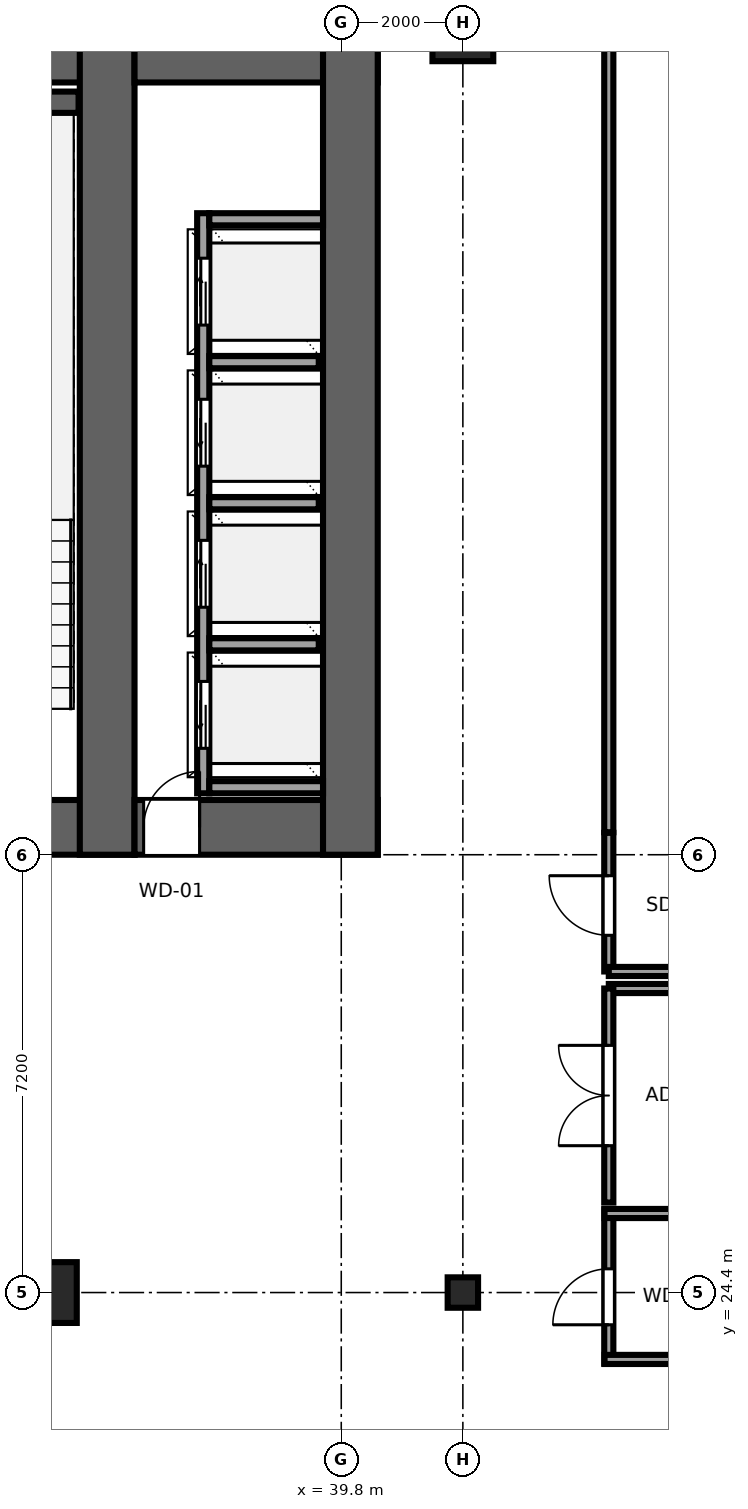
"""IFC4 building model, lengths in metres.
Left out: names, types, materials, properties, quantities, classifications, styles, units other than length and angle.
Written with IfcOpenShell. Run it as: python <this file> out.ifc"""

import sys

from ifc_helpers import new_model, si_unit, direction, frame, frame_2d, origin, origin_2d, place, context, subcontext, project, spatial, rectangle, i_section, extrude, source, transform, mapped, element, fill, save


model = new_model("IFC4")
c1 = context("Model", 3, precision=1e-05, world=origin(), true_north=direction((0.0, 1.0)))
c2 = subcontext(c1, "Body", "Model", "MODEL_VIEW")
j1 = project(units=[si_unit("LENGTHUNIT", "METRE"), si_unit("PLANEANGLEUNIT", "RADIAN")], contexts=[c1])
p1 = place(None, origin())
s1 = spatial("IfcSite", under=j1, at=p1, CompositionType="ELEMENT")
p2 = place(p1, origin())
s2 = spatial("IfcBuilding", under=s1, at=p2, CompositionType="ELEMENT")
p3 = place(p2, frame((0.0, 0.0, 74.6)))
s3 = spatial("IfcBuildingStorey", under=s2, at=p3, CompositionType="ELEMENT", Elevation=74.6)
p4 = place(p3, frame((9.6, 32.05, 0.0), z_axis=(0.0, 0.0, 1.0), x_axis=(1.0, 0.0, 0.0)))
e1 = element("IfcWall", 1, at=p4, inside=s3, PredefinedType="SHEAR", context=c2, shape_type="SweptSolid", body=[
    extrude(rectangle(XDim=26.8, YDim=0.9, at=frame_2d((13.4, 0.0))), origin(), (0.0, 0.0, 1.0), 3.55),
])
p5 = place(p4, frame((7.85, 0.0, 0.0), z_axis=(0.0, 0.0, 1.0), x_axis=(-1.0, 0.0, 0.0)))
e2 = element("IfcOpeningElement", 2, at=p5, cuts=e1, PredefinedType="OPENING", context=c2, shape_type="SweptSolid", body=[
    extrude(rectangle(XDim=1.5, YDim=2.04, at=frame_2d((0.75, 1.02))), frame((0.0, 0.46, 0.0), z_axis=(0.0, -1.0, 0.0), x_axis=(1.0, 0.0, 0.0)), (0.0, 0.0, 1.0), 0.92),
])
p6 = place(p4, frame((14.15, 0.0, 0.0), z_axis=(0.0, 0.0, 1.0), x_axis=(-1.0, 0.0, 0.0)))
e3 = element("IfcOpeningElement", 3, at=p6, cuts=e1, PredefinedType="OPENING", context=c2, shape_type="SweptSolid", body=[
    extrude(rectangle(XDim=1.5, YDim=2.04, at=frame_2d((0.75, 1.02))), frame((0.0, 0.46, 0.0), z_axis=(0.0, -1.0, 0.0), x_axis=(1.0, 0.0, 0.0)), (0.0, 0.0, 1.0), 0.92),
])
p7 = place(p4, frame((20.45, 0.0, 0.0), z_axis=(0.0, 0.0, 1.0), x_axis=(-1.0, 0.0, 0.0)))
e4 = element("IfcOpeningElement", 4, at=p7, cuts=e1, PredefinedType="OPENING", context=c2, shape_type="SweptSolid", body=[
    extrude(rectangle(XDim=1.5, YDim=2.04, at=frame_2d((0.75, 1.02))), frame((0.0, 0.46, 0.0), z_axis=(0.0, -1.0, 0.0), x_axis=(1.0, 0.0, 0.0)), (0.0, 0.0, 1.0), 0.92),
])
p8 = place(p3, frame((9.6, 44.75, 0.0), z_axis=(0.0, 0.0, 1.0), x_axis=(1.0, 0.0, 0.0)))
e5 = element("IfcWall", 5, at=p8, inside=s3, PredefinedType="SHEAR", context=c2, shape_type="SweptSolid", body=[
    extrude(rectangle(XDim=26.8, YDim=0.9, at=frame_2d((13.4, 0.0))), origin(), (0.0, 0.0, 1.0), 3.55),
])
p9 = place(p3, frame((35.95, 31.6, 0.0), z_axis=(0.0, 0.0, 1.0), x_axis=(0.0, 1.0, 0.0)))
e6 = element("IfcWall", 6, at=p9, inside=s3, PredefinedType="SHEAR", context=c2, shape_type="SweptSolid", body=[
    extrude(rectangle(XDim=13.6, YDim=0.9, at=frame_2d((6.8, 0.0))), origin(), (0.0, 0.0, 1.0), 3.55),
])
p10 = place(p3, frame((36.4, 32.05, 0.0), z_axis=(0.0, 0.0, 1.0), x_axis=(1.0, 0.0, 0.0)))
e7 = element("IfcWall", 7, at=p10, inside=s3, PredefinedType="SHEAR", context=c2, shape_type="SweptSolid", body=[
    extrude(rectangle(XDim=4.0, YDim=0.9, at=frame_2d((2.0, 0.0))), origin(), (0.0, 0.0, 1.0), 3.55),
])
p11 = place(p10, frame((1.07, 0.0, 0.0), z_axis=(0.0, 0.0, 1.0), x_axis=(-1.0, 0.0, 0.0)))
e8 = element("IfcOpeningElement", 8, at=p11, cuts=e7, PredefinedType="OPENING", context=c2, shape_type="SweptSolid", body=[
    extrude(rectangle(XDim=0.92, YDim=2.01, at=frame_2d((0.46, 1.005))), frame((0.0, 0.46, 0.0), z_axis=(0.0, -1.0, 0.0), x_axis=(1.0, 0.0, 0.0)), (0.0, 0.0, 1.0), 0.92),
])
p12 = place(p3, frame((36.4, 44.75, 0.0), z_axis=(0.0, 0.0, 1.0), x_axis=(1.0, 0.0, 0.0)))
e9 = element("IfcWall", 9, at=p12, inside=s3, PredefinedType="SHEAR", context=c2, shape_type="SweptSolid", body=[
    extrude(rectangle(XDim=4.0, YDim=0.9, at=frame_2d((2.0, 0.0))), origin(), (0.0, 0.0, 1.0), 3.55),
])
p13 = place(p3, frame((39.95, 31.6, 0.0), z_axis=(0.0, 0.0, 1.0), x_axis=(0.0, 1.0, 0.0)))
e10 = element("IfcWall", 10, at=p13, inside=s3, PredefinedType="SHEAR", context=c2, shape_type="SweptSolid", body=[
    extrude(rectangle(XDim=13.6, YDim=0.9, at=frame_2d((6.8, 0.0))), origin(), (0.0, 0.0, 1.0), 3.55),
])
p14 = place(p3, frame((31.88, 43.975, 0.0), z_axis=(0.0, 0.0, 1.0), x_axis=(1.0, 0.0, 0.0)))
e11 = element("IfcWall", 11, at=p14, inside=s3, PredefinedType="SHEAR", context=c2, shape_type="SweptSolid", body=[
    extrude(rectangle(XDim=3.6, YDim=0.35, at=frame_2d((1.8, 0.0))), origin(), (0.0, 0.0, 1.0), 3.55),
])
m1 = source(origin(), c2, "Body", "SweptSolid", [
    extrude(rectangle(XDim=1.0, YDim=1.0, at=origin_2d()), origin(), (0.0, 0.0, 1.0), 3.55),
])
p15 = place(p3, frame((34.95, 24.4, 0.0), z_axis=(0.0, 0.0, 1.0), x_axis=(1.0, 0.0, 0.0)))
e12 = element("IfcColumn", 12, at=p15, inside=s3, PredefinedType="COLUMN", context=c2, shape_type="MappedRepresentation", body=[
    mapped(m1, transform((0.0, 0.0, 0.0), x_axis=(1.0, 0.0, 0.0), y_axis=(0.0, 1.0, 0.0), z_axis=(0.0, 0.0, 1.0), scale=1.0)),
])
m2 = source(origin(), c2, "Body", "SweptSolid", [
    extrude(i_section(OverallWidth=0.5, OverallDepth=0.5, WebThickness=0.028, FlangeThickness=0.045, at=origin_2d()), origin(), (0.0, 0.0, 1.0), 3.55),
])
p16 = place(p3, frame((41.8, 24.4, 0.0), z_axis=(0.0, 0.0, 1.0), x_axis=(1.0, 0.0, 0.0)))
e13 = element("IfcColumn", 13, at=p16, inside=s3, PredefinedType="COLUMN", context=c2, shape_type="MappedRepresentation", body=[
    mapped(m2, transform((0.0, 0.0, 0.0), x_axis=(1.0, 0.0, 0.0), y_axis=(0.0, 1.0, 0.0), z_axis=(0.0, 0.0, 1.0), scale=1.0)),
])
p17 = place(p3, frame((41.8, 45.15, 0.0), z_axis=(0.0, 0.0, 1.0), x_axis=(1.0, 0.0, 0.0)))
e14 = element("IfcColumn", 14, at=p17, inside=s3, PredefinedType="COLUMN", context=c2, shape_type="MappedRepresentation", body=[
    mapped(m1, transform((0.0, 0.0, 0.0), x_axis=(1.0, 0.0, 0.0), y_axis=(0.0, 1.0, 0.0), z_axis=(0.0, 0.0, 1.0), scale=1.0)),
])
p18 = place(p3, frame((37.53, 32.61, 0.0), z_axis=(0.0, 0.0, 1.0), x_axis=(0.0, 1.0, 0.0)))
e15 = element("IfcWall", 15, at=p18, inside=s3, PredefinedType="SOLIDWALL", context=c2, shape_type="SweptSolid", body=[
    extrude(rectangle(XDim=9.54, YDim=0.2, at=frame_2d((4.77, 0.0))), origin(), (0.0, 0.0, 1.0), 3.37),
])
p19 = place(p18, frame((0.74, 0.0, 0.0)))
e16 = element("IfcOpeningElement", 16, at=p19, cuts=e15, PredefinedType="OPENING", context=c2, shape_type="SweptSolid", body=[
    extrude(rectangle(XDim=1.1, YDim=2.12, at=frame_2d((0.55, 1.06))), frame((0.0, 0.11, 0.0), z_axis=(0.0, -1.0, 0.0), x_axis=(1.0, 0.0, 0.0)), (0.0, 0.0, 1.0), 0.22),
])
p20 = place(p18, frame((3.06, 0.0, 0.0)))
e17 = element("IfcOpeningElement", 17, at=p20, cuts=e15, PredefinedType="OPENING", context=c2, shape_type="SweptSolid", body=[
    extrude(rectangle(XDim=1.1, YDim=2.12, at=frame_2d((0.55, 1.06))), frame((0.0, 0.11, 0.0), z_axis=(0.0, -1.0, 0.0), x_axis=(1.0, 0.0, 0.0)), (0.0, 0.0, 1.0), 0.22),
])
p21 = place(p18, frame((5.38, 0.0, 0.0)))
e18 = element("IfcOpeningElement", 18, at=p21, cuts=e15, PredefinedType="OPENING", context=c2, shape_type="SweptSolid", body=[
    extrude(rectangle(XDim=1.1, YDim=2.12, at=frame_2d((0.55, 1.06))), frame((0.0, 0.11, 0.0), z_axis=(0.0, -1.0, 0.0), x_axis=(1.0, 0.0, 0.0)), (0.0, 0.0, 1.0), 0.22),
])
p22 = place(p18, frame((7.7, 0.0, 0.0)))
e19 = element("IfcOpeningElement", 19, at=p22, cuts=e15, PredefinedType="OPENING", context=c2, shape_type="SweptSolid", body=[
    extrude(rectangle(XDim=1.1, YDim=2.12, at=frame_2d((0.55, 1.06))), frame((0.0, 0.11, 0.0), z_axis=(0.0, -1.0, 0.0), x_axis=(1.0, 0.0, 0.0)), (0.0, 0.0, 1.0), 0.22),
])
for number, where, z_axis, x_axis in (
    (20, (37.63, 32.71, 0.0), (0.0, 0.0, 1.0), (1.0, 0.0, 0.0)),
    (21, (37.63, 42.05, 0.0), (0.0, 0.0, 1.0), (1.0, 0.0, 0.0)),
):
    element("IfcWall", number, at=place(p3, frame(where, z_axis=z_axis, x_axis=x_axis)), inside=s3, PredefinedType="SOLIDWALL", context=c2, shape_type="SweptSolid", body=[
        extrude(rectangle(XDim=1.87, YDim=0.2, at=frame_2d((0.935, 0.0))), origin(), (0.0, 0.0, 1.0), 3.37),
    ])
for number, where, z_axis, x_axis in (
    (22, (37.63, 35.06, 0.0), (0.0, 0.0, 1.0), (1.0, 0.0, 0.0)),
    (23, (37.63, 37.38, 0.0), (0.0, 0.0, 1.0), (1.0, 0.0, 0.0)),
    (24, (37.63, 39.7, 0.0), (0.0, 0.0, 1.0), (1.0, 0.0, 0.0)),
):
    element("IfcWall", number, at=place(p3, frame(where, z_axis=z_axis, x_axis=x_axis)), inside=s3, PredefinedType="SOLIDWALL", context=c2, shape_type="SweptSolid", body=[
        extrude(rectangle(XDim=1.8, YDim=0.2, at=frame_2d((0.9, 0.0))), origin(), (0.0, 0.0, 1.0), 3.37),
    ])
p23 = place(p3, frame((44.2, 23.23, 0.0), z_axis=(0.0, 0.0, 1.0), x_axis=(0.0, 1.0, 0.0)))
e25 = element("IfcWall", 25, at=p23, inside=s3, PredefinedType="PARTITIONING", context=c2, shape_type="SweptSolid", body=[
    extrude(rectangle(XDim=2.54, YDim=0.15, at=frame_2d((1.27, 0.0))), origin(), (0.0, 0.0, 1.0), 3.37),
])
p24 = place(p23, frame((0.64, 0.0, 0.0)))
e26 = element("IfcOpeningElement", 26, at=p24, cuts=e25, PredefinedType="OPENING", context=c2, shape_type="SweptSolid", body=[
    extrude(rectangle(XDim=0.92, YDim=2.01, at=frame_2d((0.46, 1.005))), frame((0.0, 0.085, 0.0), z_axis=(0.0, -1.0, 0.0), x_axis=(1.0, 0.0, 0.0)), (0.0, 0.0, 1.0), 0.17),
])
p25 = place(p3, frame((44.13, 23.3, 0.0), z_axis=(0.0, 0.0, 1.0), x_axis=(1.0, 0.0, 0.0)))
e27 = element("IfcWall", 27, at=p25, inside=s3, PredefinedType="PARTITIONING", context=c2, shape_type="SweptSolid", body=[
    extrude(rectangle(XDim=4.54, YDim=0.15, at=frame_2d((2.27, 0.0))), origin(), (0.0, 0.0, 1.0), 3.37),
])
p26 = place(p3, frame((44.13, 25.7, 0.0), z_axis=(0.0, 0.0, 1.0), x_axis=(1.0, 0.0, 0.0)))
e28 = element("IfcWall", 28, at=p26, inside=s3, PredefinedType="PARTITIONING", context=c2, shape_type="SweptSolid", body=[
    extrude(rectangle(XDim=12.57, YDim=0.15, at=frame_2d((6.285, 0.0))), origin(), (0.0, 0.0, 1.0), 3.37),
])
p27 = place(p3, frame((44.2, 29.4, 0.0), z_axis=(0.0, 0.0, 1.0), x_axis=(1.0, 0.0, 0.0)))
e29 = element("IfcWall", 29, at=p27, inside=s3, PredefinedType="PARTITIONING", context=c2, shape_type="SweptSolid", body=[
    extrude(rectangle(XDim=12.5, YDim=0.15, at=frame_2d((6.25, 0.0))), origin(), (0.0, 0.0, 1.0), 3.37),
])
p28 = place(p3, frame((44.2, 25.88, 0.0), z_axis=(0.0, 0.0, 1.0), x_axis=(0.0, 1.0, 0.0)))
e30 = element("IfcWall", 30, at=p28, inside=s3, PredefinedType="PARTITIONING", context=c2, shape_type="SweptSolid", body=[
    extrude(rectangle(XDim=3.52, YDim=0.15, at=frame_2d((1.76, 0.0))), origin(), (0.0, 0.0, 1.0), 3.37),
])
p29 = place(p28, frame((0.935, 0.0, 0.0)))
e31 = element("IfcOpeningElement", 31, at=p29, cuts=e30, PredefinedType="OPENING", context=c2, shape_type="SweptSolid", body=[
    extrude(rectangle(XDim=1.65, YDim=2.15, at=frame_2d((0.825, 1.075))), frame((0.0, 0.085, 0.0), z_axis=(0.0, -1.0, 0.0), x_axis=(1.0, 0.0, 0.0)), (0.0, 0.0, 1.0), 0.17),
])
p30 = place(p3, frame((44.2, 29.68, 0.0), z_axis=(0.0, 0.0, 1.0), x_axis=(0.0, 1.0, 0.0)))
e32 = element("IfcWall", 32, at=p30, inside=s3, PredefinedType="PARTITIONING", context=c2, shape_type="SweptSolid", body=[
    extrude(rectangle(XDim=2.28, YDim=0.15, at=frame_2d((1.14, 0.0))), origin(), (0.0, 0.0, 1.0), 3.37),
])
p31 = place(p30, frame((0.595, 0.0, 0.0)))
e33 = element("IfcOpeningElement", 33, at=p31, cuts=e32, PredefinedType="OPENING", context=c2, shape_type="SweptSolid", body=[
    extrude(rectangle(XDim=0.98, YDim=2.12, at=frame_2d((0.49, 1.06))), frame((0.0, 0.085, 0.0), z_axis=(0.0, -1.0, 0.0), x_axis=(1.0, 0.0, 0.0)), (0.0, 0.0, 1.0), 0.17),
])
p32 = place(p3, frame((44.2, 29.68, 0.0), z_axis=(0.0, 0.0, 1.0), x_axis=(1.0, 0.0, 0.0)))
e34 = element("IfcWall", 34, at=p32, inside=s3, PredefinedType="PARTITIONING", context=c2, shape_type="SweptSolid", body=[
    extrude(rectangle(XDim=10.03, YDim=0.15, at=frame_2d((5.015, 0.0))), origin(), (0.0, 0.0, 1.0), 3.37),
])
p33 = place(p3, frame((44.2, 31.97, 0.0), z_axis=(0.0, 0.0, 1.0), x_axis=(0.0, 1.0, 0.0)))
e35 = element("IfcWall", 35, at=p33, inside=s3, PredefinedType="PARTITIONING", context=c2, shape_type="SweptSolid", body=[
    extrude(rectangle(XDim=13.625, YDim=0.15, at=frame_2d((6.812, 0.0))), origin(), (0.0, 0.0, 1.0), 3.37),
])
m3 = source(origin(), c2, "Body", "SweptSolid", [
    extrude(rectangle(XDim=0.92, YDim=2.01, at=frame_2d((0.46, 1.005))), frame((0.0, 0.025, 0.0), z_axis=(0.0, -1.0, 0.0), x_axis=(1.0, 0.0, 0.0)), (0.0, 0.0, 1.0), 0.05),
])
p34 = place(p11, origin())
e36 = element("IfcDoor", 36, at=p34, inside=s3, OperationType="SINGLE_SWING_RIGHT", PredefinedType="DOOR", context=c2, shape_type="MappedRepresentation", body=[
    mapped(m3, transform((0.0, 0.0, 0.0), x_axis=(1.0, 0.0, 0.0), y_axis=(0.0, 1.0, 0.0), z_axis=(0.0, 0.0, 1.0), scale=1.0)),
])
fill(e8, e36)
m4 = source(origin(), c2, "Body", "SweptSolid", [
    extrude(rectangle(XDim=1.1, YDim=2.12, at=frame_2d((0.55, 1.06))), frame((0.0, 0.025, 0.0), z_axis=(0.0, -1.0, 0.0), x_axis=(1.0, 0.0, 0.0)), (0.0, 0.0, 1.0), 0.05),
])
p35 = place(p19, origin())
e37 = element("IfcDoor", 37, at=p35, inside=s3, OperationType="SLIDING_TO_LEFT", PredefinedType="DOOR", context=c2, shape_type="MappedRepresentation", body=[
    mapped(m4, transform((0.0, 0.0, 0.0), x_axis=(1.0, 0.0, 0.0), y_axis=(0.0, 1.0, 0.0), z_axis=(0.0, 0.0, 1.0), scale=1.0)),
])
fill(e16, e37)
p36 = place(p20, origin())
e38 = element("IfcDoor", 38, at=p36, inside=s3, OperationType="SLIDING_TO_RIGHT", PredefinedType="DOOR", context=c2, shape_type="MappedRepresentation", body=[
    mapped(m4, transform((0.0, 0.0, 0.0), x_axis=(1.0, 0.0, 0.0), y_axis=(0.0, 1.0, 0.0), z_axis=(0.0, 0.0, 1.0), scale=1.0)),
])
fill(e17, e38)
p37 = place(p21, origin())
e39 = element("IfcDoor", 39, at=p37, inside=s3, OperationType="SLIDING_TO_LEFT", PredefinedType="DOOR", context=c2, shape_type="MappedRepresentation", body=[
    mapped(m4, transform((0.0, 0.0, 0.0), x_axis=(1.0, 0.0, 0.0), y_axis=(0.0, 1.0, 0.0), z_axis=(0.0, 0.0, 1.0), scale=1.0)),
])
fill(e18, e39)
p38 = place(p22, origin())
e40 = element("IfcDoor", 40, at=p38, inside=s3, OperationType="SLIDING_TO_RIGHT", PredefinedType="DOOR", context=c2, shape_type="MappedRepresentation", body=[
    mapped(m4, transform((0.0, 0.0, 0.0), x_axis=(1.0, 0.0, 0.0), y_axis=(0.0, 1.0, 0.0), z_axis=(0.0, 0.0, 1.0), scale=1.0)),
])
fill(e19, e40)
p39 = place(p24, origin())
e41 = element("IfcDoor", 41, at=p39, inside=s3, OperationType="SINGLE_SWING_LEFT", PredefinedType="DOOR", context=c2, shape_type="MappedRepresentation", body=[
    mapped(m3, transform((0.0, 0.0, 0.0), x_axis=(1.0, 0.0, 0.0), y_axis=(0.0, 1.0, 0.0), z_axis=(0.0, 0.0, 1.0), scale=1.0)),
])
fill(e26, e41)
m5 = source(origin(), c2, "Body", "SweptSolid", [
    extrude(rectangle(XDim=1.65, YDim=2.15, at=frame_2d((0.825, 1.075))), frame((0.0, 0.025, 0.0), z_axis=(0.0, -1.0, 0.0), x_axis=(1.0, 0.0, 0.0)), (0.0, 0.0, 1.0), 0.05),
])
p40 = place(p29, origin())
e42 = element("IfcDoor", 42, at=p40, inside=s3, OperationType="DOUBLE_DOOR_SINGLE_SWING", PredefinedType="DOOR", context=c2, shape_type="MappedRepresentation", body=[
    mapped(m5, transform((0.0, 0.0, 0.0), x_axis=(1.0, 0.0, 0.0), y_axis=(0.0, 1.0, 0.0), z_axis=(0.0, 0.0, 1.0), scale=1.0)),
])
fill(e31, e42)
m6 = source(origin(), c2, "Body", "SweptSolid", [
    extrude(rectangle(XDim=0.98, YDim=2.12, at=frame_2d((0.49, 1.06))), frame((0.0, 0.025, 0.0), z_axis=(0.0, -1.0, 0.0), x_axis=(1.0, 0.0, 0.0)), (0.0, 0.0, 1.0), 0.05),
])
p41 = place(p31, origin())
e43 = element("IfcDoor", 43, at=p41, inside=s3, OperationType="SINGLE_SWING_RIGHT", PredefinedType="DOOR", context=c2, shape_type="MappedRepresentation", body=[
    mapped(m6, transform((0.0, 0.0, 0.0), x_axis=(1.0, 0.0, 0.0), y_axis=(0.0, 1.0, 0.0), z_axis=(0.0, 0.0, 1.0), scale=1.0)),
])
fill(e33, e43)
save(model, sys.argv[1])
